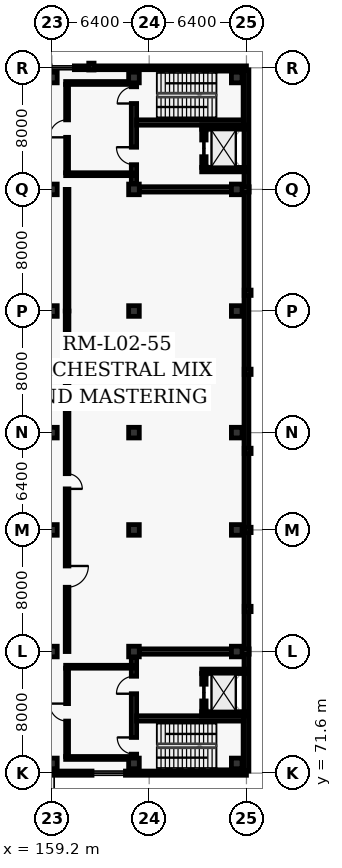
"""IFC4 building model, lengths in metres.
Left out: names, types, materials, properties, quantities, classifications, styles, units other than length and angle.
Written with IfcOpenShell. Run it as: python <this file> out.ifc"""

import sys

from ifc_helpers import new_model, si_unit, direction, frame, frame_2d, origin, origin_2d, place, context, subcontext, project, spatial, rectangle, extrude, element, fill, save


model = new_model("IFC4")
c1 = context("Model", 3, precision=1e-05, world=origin(), true_north=direction((0.0, 1.0)))
c2 = subcontext(c1, "Body", "Model", "MODEL_VIEW")
j1 = project(units=[si_unit("LENGTHUNIT", "METRE"), si_unit("PLANEANGLEUNIT", "RADIAN")], contexts=[c1])
p1 = place(None, origin())
s1 = spatial("IfcSite", under=j1, at=p1, CompositionType="ELEMENT")
p2 = place(p1, origin())
s2 = spatial("IfcBuilding", under=s1, at=p2, CompositionType="ELEMENT")
p3 = place(p2, frame((0.0, 0.0, 10.2)))
s3 = spatial("IfcBuildingStorey", under=s2, at=p3, CompositionType="ELEMENT", Elevation=10.2)
for number, where, z_axis, x_axis in (
    (1, (159.2, 72.24, 0.0), (0.0, 0.0, 1.0), (1.0, 0.0, 0.0)),
    (2, (159.2, 79.6, 0.0), (0.0, 0.0, 1.0), (1.0, 0.0, 0.0)),
    (3, (159.2, 87.6, 0.0), (0.0, 0.0, 1.0), (1.0, 0.0, 0.0)),
    (4, (159.2, 94.0, 0.0), (0.0, 0.0, 1.0), (1.0, 0.0, 0.0)),
    (5, (159.2, 102.0, 0.0), (0.0, 0.0, 1.0), (1.0, 0.0, 0.0)),
    (6, (159.2, 110.0, 0.0), (0.0, 0.0, 1.0), (1.0, 0.0, 0.0)),
    (7, (159.2, 117.36, 0.0), (0.0, 0.0, 1.0), (1.0, 0.0, 0.0)),
    (8, (164.6, 72.24, 0.0), (0.0, 0.0, 1.0), (1.0, 0.0, 0.0)),
    (9, (164.6, 79.6, 0.0), (0.0, 0.0, 1.0), (1.0, 0.0, 0.0)),
    (10, (164.6, 87.6, 0.0), (0.0, 0.0, 1.0), (1.0, 0.0, 0.0)),
    (11, (164.6, 94.0, 0.0), (0.0, 0.0, 1.0), (1.0, 0.0, 0.0)),
    (12, (164.6, 102.0, 0.0), (0.0, 0.0, 1.0), (1.0, 0.0, 0.0)),
    (13, (164.6, 110.0, 0.0), (0.0, 0.0, 1.0), (1.0, 0.0, 0.0)),
    (14, (164.6, 117.36, 0.0), (0.0, 0.0, 1.0), (1.0, 0.0, 0.0)),
    (15, (171.36, 72.24, 0.0), (0.0, 0.0, 1.0), (1.0, 0.0, 0.0)),
    (16, (171.36, 79.6, 0.0), (0.0, 0.0, 1.0), (1.0, 0.0, 0.0)),
    (17, (171.36, 87.6, 0.0), (0.0, 0.0, 1.0), (1.0, 0.0, 0.0)),
    (18, (171.36, 94.0, 0.0), (0.0, 0.0, 1.0), (1.0, 0.0, 0.0)),
    (19, (171.36, 102.0, 0.0), (0.0, 0.0, 1.0), (1.0, 0.0, 0.0)),
    (20, (171.36, 110.0, 0.0), (0.0, 0.0, 1.0), (1.0, 0.0, 0.0)),
    (21, (171.36, 117.36, 0.0), (0.0, 0.0, 1.0), (1.0, 0.0, 0.0)),
):
    element("IfcColumn", number, at=place(p3, frame(where, z_axis=z_axis, x_axis=x_axis)), inside=s3, PredefinedType="COLUMN", context=c2, shape_type="SweptSolid", body=[
        extrude(rectangle(XDim=0.7, YDim=0.7, at=origin_2d()), origin(), (0.0, 0.0, 1.0), 5.4),
    ])
for number, where, z_axis, x_axis in (
    (22, (172.08, 82.4, 0.0), (0.0, 0.0, 1.0), (1.0, 0.0, 0.0)),
    (23, (172.08, 87.6, 0.0), (0.0, 0.0, 1.0), (1.0, 0.0, 0.0)),
    (24, (172.08, 92.8, 0.0), (0.0, 0.0, 1.0), (1.0, 0.0, 0.0)),
    (25, (172.08, 98.0, 0.0), (0.0, 0.0, 1.0), (1.0, 0.0, 0.0)),
    (26, (172.08, 103.2, 0.0), (0.0, 0.0, 1.0), (1.0, 0.0, 0.0)),
    (27, (161.8, 118.08, 0.0), (0.0, 0.0, 1.0), (0.0, 1.0, 0.0)),
):
    element("IfcColumn", number, at=place(p3, frame(where, z_axis=z_axis, x_axis=x_axis)), inside=s3, PredefinedType="PILASTER", context=c2, shape_type="SweptSolid", body=[
        extrude(rectangle(XDim=0.35, YDim=0.45, at=origin_2d()), origin(), (0.0, 0.0, 1.0), 5.4),
    ])
p4 = place(p3, frame((139.6, 118.0, 0.0), z_axis=(0.0, 0.0, 1.0), x_axis=(1.0, 0.0, 0.0)))
e28 = element("IfcWall", 28, at=p4, inside=s3, PredefinedType="SOLIDWALL", context=c2, shape_type="SweptSolid", body=[
    extrude(rectangle(XDim=32.4, YDim=0.25, at=frame_2d((16.2, 0.0))), origin(), (0.0, 0.0, 1.0), 5.16),
])
p5 = place(p4, frame((2.2, 0.0, 0.9)))
e29 = element("IfcOpeningElement", 29, at=p5, cuts=e28, PredefinedType="OPENING", context=c2, shape_type="SweptSolid", body=[
    extrude(rectangle(XDim=3.4, YDim=2.55, at=frame_2d((1.7, 1.275))), frame((0.0, 0.135, 0.0), z_axis=(0.0, -1.0, 0.0), x_axis=(1.0, 0.0, 0.0)), (0.0, 0.0, 1.0), 0.27),
])
p6 = place(p4, frame((7.96, 0.0, 0.9)))
e30 = element("IfcOpeningElement", 30, at=p6, cuts=e28, PredefinedType="OPENING", context=c2, shape_type="SweptSolid", body=[
    extrude(rectangle(XDim=3.5, YDim=2.55, at=frame_2d((1.75, 1.275))), frame((0.0, 0.135, 0.0), z_axis=(0.0, -1.0, 0.0), x_axis=(1.0, 0.0, 0.0)), (0.0, 0.0, 1.0), 0.27),
])
p7 = place(p4, frame((12.27, 0.0, 0.9)))
e31 = element("IfcOpeningElement", 31, at=p7, cuts=e28, PredefinedType="OPENING", context=c2, shape_type="SweptSolid", body=[
    extrude(rectangle(XDim=3.6, YDim=2.6, at=frame_2d((1.8, 1.3))), frame((0.0, 0.135, 0.0), z_axis=(0.0, -1.0, 0.0), x_axis=(1.0, 0.0, 0.0)), (0.0, 0.0, 1.0), 0.27),
])
p8 = place(p4, frame((19.48, 0.0, 0.9)))
e32 = element("IfcOpeningElement", 32, at=p8, cuts=e28, PredefinedType="OPENING", context=c2, shape_type="SweptSolid", body=[
    extrude(rectangle(XDim=1.6, YDim=1.65, at=frame_2d((0.8, 0.825))), frame((0.0, 0.135, 0.0), z_axis=(0.0, -1.0, 0.0), x_axis=(1.0, 0.0, 0.0)), (0.0, 0.0, 1.0), 0.27),
])
p9 = place(p3, frame((172.0, 117.86, 0.0), z_axis=(0.0, 0.0, 1.0), x_axis=(0.0, -1.0, 0.0)))
e33 = element("IfcWall", 33, at=p9, inside=s3, PredefinedType="SOLIDWALL", context=c2, shape_type="SweptSolid", body=[
    extrude(rectangle(XDim=46.12, YDim=0.32, at=frame_2d((23.06, 0.0))), origin(), (0.0, 0.0, 1.0), 5.16),
])
p10 = place(p3, frame((172.0, 71.6, 0.0), z_axis=(0.0, 0.0, 1.0), x_axis=(-1.0, 0.0, 0.0)))
e34 = element("IfcWall", 34, at=p10, inside=s3, PredefinedType="SOLIDWALL", context=c2, shape_type="SweptSolid", body=[
    extrude(rectangle(XDim=32.4, YDim=0.275, at=frame_2d((16.2, 0.0))), origin(), (0.0, 0.0, 1.0), 5.16),
])
p11 = place(p10, frame((7.96, 0.0, 0.8)))
e35 = element("IfcOpeningElement", 35, at=p11, cuts=e34, PredefinedType="OPENING", context=c2, shape_type="SweptSolid", body=[
    extrude(rectangle(XDim=2.2, YDim=2.25, at=frame_2d((1.1, 1.125))), frame((0.0, 0.147, 0.0), z_axis=(0.0, -1.0, 0.0), x_axis=(1.0, 0.0, 0.0)), (0.0, 0.0, 1.0), 0.295),
])
p12 = place(p10, frame((13.72, 0.0, 0.8)))
e36 = element("IfcOpeningElement", 36, at=p12, cuts=e34, PredefinedType="OPENING", context=c2, shape_type="SweptSolid", body=[
    extrude(rectangle(XDim=2.3, YDim=2.25, at=frame_2d((1.15, 1.125))), frame((0.0, 0.147, 0.0), z_axis=(0.0, -1.0, 0.0), x_axis=(1.0, 0.0, 0.0)), (0.0, 0.0, 1.0), 0.295),
])
p13 = place(p10, frame((20.93, 0.0, 0.8)))
e37 = element("IfcOpeningElement", 37, at=p13, cuts=e34, PredefinedType="OPENING", context=c2, shape_type="SweptSolid", body=[
    extrude(rectangle(XDim=2.4, YDim=2.3, at=frame_2d((1.2, 1.15))), frame((0.0, 0.147, 0.0), z_axis=(0.0, -1.0, 0.0), x_axis=(1.0, 0.0, 0.0)), (0.0, 0.0, 1.0), 0.295),
])
p14 = place(p10, frame((25.24, 0.0, 0.8)))
e38 = element("IfcOpeningElement", 38, at=p14, cuts=e34, PredefinedType="OPENING", context=c2, shape_type="SweptSolid", body=[
    extrude(rectangle(XDim=2.5, YDim=2.3, at=frame_2d((1.25, 1.15))), frame((0.0, 0.147, 0.0), z_axis=(0.0, -1.0, 0.0), x_axis=(1.0, 0.0, 0.0)), (0.0, 0.0, 1.0), 0.295),
])
p15 = place(p10, frame((17.18, 0.0, 0.0)))
e39 = element("IfcOpeningElement", 39, at=p15, cuts=e34, PredefinedType="OPENING", context=c2, shape_type="SweptSolid", body=[
    extrude(rectangle(XDim=1.4, YDim=2.25, at=frame_2d((0.7, 1.125))), frame((0.0, 0.147, 0.0), z_axis=(0.0, -1.0, 0.0), x_axis=(1.0, 0.0, 0.0)), (0.0, 0.0, 1.0), 0.295),
])
p16 = place(p3, frame((164.952, 79.6, 0.0), z_axis=(0.0, 0.0, 1.0), x_axis=(1.0, 0.0, 0.0)))
e40 = element("IfcWall", 40, at=p16, inside=s3, PredefinedType="SHEAR", context=c2, shape_type="SweptSolid", body=[
    extrude(rectangle(XDim=7.223, YDim=0.35, at=frame_2d((3.612, 0.0))), origin(), (0.0, 0.0, 1.0), 5.16),
])
p17 = place(p3, frame((164.6, 71.775, 0.0), z_axis=(0.0, 0.0, 1.0), x_axis=(0.0, 1.0, 0.0)))
e41 = element("IfcWall", 41, at=p17, inside=s3, PredefinedType="SHEAR", context=c2, shape_type="SweptSolid", body=[
    extrude(rectangle(XDim=7.473, YDim=0.35, at=frame_2d((3.737, 0.0))), origin(), (0.0, 0.0, 1.0), 5.16),
])
p18 = place(p17, frame((1.075, 0.0, 0.0)))
e42 = element("IfcOpeningElement", 42, at=p18, cuts=e41, PredefinedType="OPENING", context=c2, shape_type="SweptSolid", body=[
    extrude(rectangle(XDim=1.1, YDim=2.15, at=frame_2d((0.55, 1.075))), frame((0.0, 0.185, 0.0), z_axis=(0.0, -1.0, 0.0), x_axis=(1.0, 0.0, 0.0)), (0.0, 0.0, 1.0), 0.37),
])
p19 = place(p17, frame((5.05, 0.0, 0.0)))
e43 = element("IfcOpeningElement", 43, at=p19, cuts=e41, PredefinedType="OPENING", context=c2, shape_type="SweptSolid", body=[
    extrude(rectangle(XDim=1.15, YDim=2.2, at=frame_2d((0.575, 1.1))), frame((0.0, 0.185, 0.0), z_axis=(0.0, -1.0, 0.0), x_axis=(1.0, 0.0, 0.0)), (0.0, 0.0, 1.0), 0.37),
])
p20 = place(p3, frame((164.775, 75.2, 0.0), z_axis=(0.0, 0.0, 1.0), x_axis=(1.0, 0.0, 0.0)))
e44 = element("IfcWall", 44, at=p20, inside=s3, PredefinedType="SHEAR", context=c2, shape_type="SweptSolid", body=[
    extrude(rectangle(XDim=7.05, YDim=0.35, at=frame_2d((3.525, 0.0))), origin(), (0.0, 0.0, 1.0), 5.16),
])
for number, where, z_axis, x_axis in (
    (45, (169.055, 75.5, 0.0), (0.0, 0.0, 1.0), (1.0, 0.0, 0.0)),
    (46, (169.055, 78.3, 0.0), (0.0, 0.0, 1.0), (1.0, 0.0, 0.0)),
):
    element("IfcWall", number, at=place(p3, frame(where, z_axis=z_axis, x_axis=x_axis)), inside=s3, PredefinedType="SHEAR", context=c2, shape_type="SweptSolid", body=[
        extrude(rectangle(XDim=2.89, YDim=0.29, at=frame_2d((1.445, 0.0))), origin(), (0.0, 0.0, 1.0), 5.16),
    ])
p21 = place(p3, frame((169.2, 75.645, 0.0), z_axis=(0.0, 0.0, 1.0), x_axis=(0.0, 1.0, 0.0)))
e47 = element("IfcWall", 47, at=p21, inside=s3, PredefinedType="SHEAR", context=c2, shape_type="SweptSolid", body=[
    extrude(rectangle(XDim=2.51, YDim=0.29, at=frame_2d((1.255, 0.0))), origin(), (0.0, 0.0, 1.0), 5.16),
])
p22 = place(p21, frame((0.705, 0.0, 0.0)))
e48 = element("IfcOpeningElement", 48, at=p22, cuts=e47, PredefinedType="OPENING", context=c2, shape_type="SweptSolid", body=[
    extrude(rectangle(XDim=1.1, YDim=2.15, at=frame_2d((0.55, 1.075))), frame((0.0, 0.155, 0.0), z_axis=(0.0, -1.0, 0.0), x_axis=(1.0, 0.0, 0.0)), (0.0, 0.0, 1.0), 0.31),
])
p23 = place(p3, frame((160.105, 72.6, 0.0), z_axis=(0.0, 0.0, 1.0), x_axis=(1.0, 0.0, 0.0)))
e49 = element("IfcWall", 49, at=p23, inside=s3, PredefinedType="PARTITIONING", context=c2, shape_type="SweptSolid", body=[
    extrude(rectangle(XDim=4.143, YDim=0.19, at=frame_2d((2.072, 0.0))), origin(), (0.0, 0.0, 1.0), 4.51),
])
p24 = place(p3, frame((160.105, 78.6, 0.0), z_axis=(0.0, 0.0, 1.0), x_axis=(1.0, 0.0, 0.0)))
e50 = element("IfcWall", 50, at=p24, inside=s3, PredefinedType="PARTITIONING", context=c2, shape_type="SweptSolid", body=[
    extrude(rectangle(XDim=4.495, YDim=0.19, at=frame_2d((2.248, 0.0))), origin(), (0.0, 0.0, 1.0), 5.16),
])
p25 = place(p3, frame((160.2, 72.695, 0.0), z_axis=(0.0, 0.0, 1.0), x_axis=(0.0, 1.0, 0.0)))
e51 = element("IfcWall", 51, at=p25, inside=s3, PredefinedType="PARTITIONING", context=c2, shape_type="SweptSolid", body=[
    extrude(rectangle(XDim=5.81, YDim=0.19, at=frame_2d((2.905, 0.0))), origin(), (0.0, 0.0, 1.0), 5.16),
])
p26 = place(p25, frame((2.33, 0.0, 0.0)))
e52 = element("IfcOpeningElement", 52, at=p26, cuts=e51, PredefinedType="OPENING", context=c2, shape_type="SweptSolid", body=[
    extrude(rectangle(XDim=1.15, YDim=2.2, at=frame_2d((0.575, 1.1))), frame((0.0, 0.105, 0.0), z_axis=(0.0, -1.0, 0.0), x_axis=(1.0, 0.0, 0.0)), (0.0, 0.0, 1.0), 0.21),
])
p27 = place(p3, frame((164.952, 110.0, 0.0), z_axis=(0.0, 0.0, 1.0), x_axis=(1.0, 0.0, 0.0)))
e53 = element("IfcWall", 53, at=p27, inside=s3, PredefinedType="SHEAR", context=c2, shape_type="SweptSolid", body=[
    extrude(rectangle(XDim=7.223, YDim=0.35, at=frame_2d((3.612, 0.0))), origin(), (0.0, 0.0, 1.0), 5.16),
])
p28 = place(p3, frame((164.6, 110.352, 0.0), z_axis=(0.0, 0.0, 1.0), x_axis=(0.0, 1.0, 0.0)))
e54 = element("IfcWall", 54, at=p28, inside=s3, PredefinedType="SHEAR", context=c2, shape_type="SweptSolid", body=[
    extrude(rectangle(XDim=7.473, YDim=0.35, at=frame_2d((3.736, 0.0))), origin(), (0.0, 0.0, 1.0), 5.16),
])
p29 = place(p28, frame((5.298, 0.0, 0.0)))
e55 = element("IfcOpeningElement", 55, at=p29, cuts=e54, PredefinedType="OPENING", context=c2, shape_type="SweptSolid", body=[
    extrude(rectangle(XDim=1.1, YDim=2.15, at=frame_2d((0.55, 1.075))), frame((0.0, 0.185, 0.0), z_axis=(0.0, -1.0, 0.0), x_axis=(1.0, 0.0, 0.0)), (0.0, 0.0, 1.0), 0.37),
])
p30 = place(p28, frame((1.273, 0.0, 0.0)))
e56 = element("IfcOpeningElement", 56, at=p30, cuts=e54, PredefinedType="OPENING", context=c2, shape_type="SweptSolid", body=[
    extrude(rectangle(XDim=1.15, YDim=2.2, at=frame_2d((0.575, 1.1))), frame((0.0, 0.185, 0.0), z_axis=(0.0, -1.0, 0.0), x_axis=(1.0, 0.0, 0.0)), (0.0, 0.0, 1.0), 0.37),
])
p31 = place(p3, frame((164.775, 114.4, 0.0), z_axis=(0.0, 0.0, 1.0), x_axis=(1.0, 0.0, 0.0)))
e57 = element("IfcWall", 57, at=p31, inside=s3, PredefinedType="SHEAR", context=c2, shape_type="SweptSolid", body=[
    extrude(rectangle(XDim=7.05, YDim=0.35, at=frame_2d((3.525, 0.0))), origin(), (0.0, 0.0, 1.0), 5.16),
])
for number, where, z_axis, x_axis in (
    (58, (169.055, 111.3, 0.0), (0.0, 0.0, 1.0), (1.0, 0.0, 0.0)),
    (59, (169.055, 114.1, 0.0), (0.0, 0.0, 1.0), (1.0, 0.0, 0.0)),
):
    element("IfcWall", number, at=place(p3, frame(where, z_axis=z_axis, x_axis=x_axis)), inside=s3, PredefinedType="SHEAR", context=c2, shape_type="SweptSolid", body=[
        extrude(rectangle(XDim=2.89, YDim=0.29, at=frame_2d((1.445, 0.0))), origin(), (0.0, 0.0, 1.0), 5.16),
    ])
p32 = place(p3, frame((169.2, 111.445, 0.0), z_axis=(0.0, 0.0, 1.0), x_axis=(0.0, 1.0, 0.0)))
e60 = element("IfcWall", 60, at=p32, inside=s3, PredefinedType="SHEAR", context=c2, shape_type="SweptSolid", body=[
    extrude(rectangle(XDim=2.51, YDim=0.29, at=frame_2d((1.255, 0.0))), origin(), (0.0, 0.0, 1.0), 5.16),
])
p33 = place(p32, frame((0.705, 0.0, 0.0)))
e61 = element("IfcOpeningElement", 61, at=p33, cuts=e60, PredefinedType="OPENING", context=c2, shape_type="SweptSolid", body=[
    extrude(rectangle(XDim=1.1, YDim=2.15, at=frame_2d((0.55, 1.075))), frame((0.0, 0.155, 0.0), z_axis=(0.0, -1.0, 0.0), x_axis=(1.0, 0.0, 0.0)), (0.0, 0.0, 1.0), 0.31),
])
p34 = place(p3, frame((160.105, 111.0, 0.0), z_axis=(0.0, 0.0, 1.0), x_axis=(1.0, 0.0, 0.0)))
e62 = element("IfcWall", 62, at=p34, inside=s3, PredefinedType="PARTITIONING", context=c2, shape_type="SweptSolid", body=[
    extrude(rectangle(XDim=4.495, YDim=0.19, at=frame_2d((2.248, 0.0))), origin(), (0.0, 0.0, 1.0), 5.16),
])
p35 = place(p3, frame((160.105, 117.0, 0.0), z_axis=(0.0, 0.0, 1.0), x_axis=(1.0, 0.0, 0.0)))
e63 = element("IfcWall", 63, at=p35, inside=s3, PredefinedType="PARTITIONING", context=c2, shape_type="SweptSolid", body=[
    extrude(rectangle(XDim=4.143, YDim=0.19, at=frame_2d((2.072, 0.0))), origin(), (0.0, 0.0, 1.0), 4.51),
])
p36 = place(p3, frame((160.2, 111.095, 0.0), z_axis=(0.0, 0.0, 1.0), x_axis=(0.0, 1.0, 0.0)))
e64 = element("IfcWall", 64, at=p36, inside=s3, PredefinedType="PARTITIONING", context=c2, shape_type="SweptSolid", body=[
    extrude(rectangle(XDim=5.81, YDim=0.19, at=frame_2d((2.905, 0.0))), origin(), (0.0, 0.0, 1.0), 5.16),
])
p37 = place(p36, frame((2.33, 0.0, 0.0)))
e65 = element("IfcOpeningElement", 65, at=p37, cuts=e64, PredefinedType="OPENING", context=c2, shape_type="SweptSolid", body=[
    extrude(rectangle(XDim=1.15, YDim=2.2, at=frame_2d((0.575, 1.1))), frame((0.0, 0.105, 0.0), z_axis=(0.0, -1.0, 0.0), x_axis=(1.0, 0.0, 0.0)), (0.0, 0.0, 1.0), 0.21),
])
p38 = place(p3, frame((160.2, 110.0, 0.0), z_axis=(0.0, 0.0, 1.0), x_axis=(0.0, -1.0, 0.0)))
e66 = element("IfcWall", 66, at=p38, inside=s3, PredefinedType="PARTITIONING", context=c2, shape_type="SweptSolid", body=[
    extrude(rectangle(XDim=8.0, YDim=0.24, at=frame_2d((4.0, 0.0))), origin(), (0.0, 0.0, 1.0), 5.16),
])
p39 = place(p3, frame((160.2, 102.0, 0.0), z_axis=(0.0, 0.0, 1.0), x_axis=(0.0, -1.0, 0.0)))
e67 = element("IfcWall", 67, at=p39, inside=s3, PredefinedType="PARTITIONING", context=c2, shape_type="SweptSolid", body=[
    extrude(rectangle(XDim=22.4, YDim=0.24, at=frame_2d((11.2, 0.0))), origin(), (0.0, 0.0, 1.0), 5.16),
])
p40 = place(p39, frame((10.7, 0.0, 0.0)))
e68 = element("IfcOpeningElement", 68, at=p40, cuts=e67, PredefinedType="OPENING", context=c2, shape_type="SweptSolid", body=[
    extrude(rectangle(XDim=1.0, YDim=2.1, at=frame_2d((0.5, 1.05))), frame((0.0, 0.13, 0.0), z_axis=(0.0, -1.0, 0.0), x_axis=(1.0, 0.0, 0.0)), (0.0, 0.0, 1.0), 0.26),
])
p41 = place(p39, frame((16.772, 0.0, 0.0)))
e69 = element("IfcOpeningElement", 69, at=p41, cuts=e67, PredefinedType="OPENING", context=c2, shape_type="SweptSolid", body=[
    extrude(rectangle(XDim=1.4, YDim=2.25, at=frame_2d((0.7, 1.125))), frame((0.0, 0.13, 0.0), z_axis=(0.0, -1.0, 0.0), x_axis=(1.0, 0.0, 0.0)), (0.0, 0.0, 1.0), 0.26),
])
p42 = place(p8, origin())
e70 = element("IfcWindow", 70, at=p42, inside=s3, PartitioningType="SINGLE_PANEL", PredefinedType="WINDOW", context=c2, shape_type="SweptSolid", body=[
    extrude(rectangle(XDim=1.6, YDim=1.65, at=frame_2d((0.8, 0.825))), frame((0.0, 0.03, 0.0), z_axis=(0.0, -1.0, 0.0), x_axis=(1.0, 0.0, 0.0)), (0.0, 0.0, 1.0), 0.06),
])
fill(e32, e70)
p43 = place(p11, origin())
e71 = element("IfcWindow", 71, at=p43, inside=s3, PartitioningType="SINGLE_PANEL", PredefinedType="WINDOW", context=c2, shape_type="SweptSolid", body=[
    extrude(rectangle(XDim=2.2, YDim=2.25, at=frame_2d((1.1, 1.125))), frame((0.0, 0.03, 0.0), z_axis=(0.0, -1.0, 0.0), x_axis=(1.0, 0.0, 0.0)), (0.0, 0.0, 1.0), 0.06),
])
fill(e35, e71)
p44 = place(p18, origin())
e72 = element("IfcDoor", 72, at=p44, inside=s3, OperationType="SINGLE_SWING_RIGHT", PredefinedType="DOOR", context=c2, shape_type="SweptSolid", body=[
    extrude(rectangle(XDim=1.1, YDim=2.15, at=frame_2d((0.55, 1.075))), frame((0.0, 0.025, 0.0), z_axis=(0.0, -1.0, 0.0), x_axis=(1.0, 0.0, 0.0)), (0.0, 0.0, 1.0), 0.05),
])
fill(e42, e72)
p45 = place(p19, origin())
e73 = element("IfcDoor", 73, at=p45, inside=s3, OperationType="SINGLE_SWING_LEFT", PredefinedType="DOOR", context=c2, shape_type="SweptSolid", body=[
    extrude(rectangle(XDim=1.15, YDim=2.2, at=frame_2d((0.575, 1.1))), frame((0.0, 0.025, 0.0), z_axis=(0.0, -1.0, 0.0), x_axis=(1.0, 0.0, 0.0)), (0.0, 0.0, 1.0), 0.05),
])
fill(e43, e73)
p46 = place(p22, origin())
e74 = element("IfcDoor", 74, at=p46, inside=s3, OperationType="SLIDING_TO_LEFT", PredefinedType="DOOR", context=c2, shape_type="SweptSolid", body=[
    extrude(rectangle(XDim=1.1, YDim=2.15, at=frame_2d((0.55, 1.075))), frame((0.0, 0.025, 0.0), z_axis=(0.0, -1.0, 0.0), x_axis=(1.0, 0.0, 0.0)), (0.0, 0.0, 1.0), 0.05),
])
fill(e48, e74)
p47 = place(p26, origin())
e75 = element("IfcDoor", 75, at=p47, inside=s3, OperationType="SINGLE_SWING_RIGHT", PredefinedType="DOOR", context=c2, shape_type="SweptSolid", body=[
    extrude(rectangle(XDim=1.15, YDim=2.2, at=frame_2d((0.575, 1.1))), frame((0.0, 0.025, 0.0), z_axis=(0.0, -1.0, 0.0), x_axis=(1.0, 0.0, 0.0)), (0.0, 0.0, 1.0), 0.05),
])
fill(e52, e75)
p48 = place(p29, origin())
e76 = element("IfcDoor", 76, at=p48, inside=s3, OperationType="SINGLE_SWING_LEFT", PredefinedType="DOOR", context=c2, shape_type="SweptSolid", body=[
    extrude(rectangle(XDim=1.1, YDim=2.15, at=frame_2d((0.55, 1.075))), frame((0.0, 0.025, 0.0), z_axis=(0.0, -1.0, 0.0), x_axis=(1.0, 0.0, 0.0)), (0.0, 0.0, 1.0), 0.05),
])
fill(e55, e76)
p49 = place(p30, origin())
e77 = element("IfcDoor", 77, at=p49, inside=s3, OperationType="SINGLE_SWING_RIGHT", PredefinedType="DOOR", context=c2, shape_type="SweptSolid", body=[
    extrude(rectangle(XDim=1.15, YDim=2.2, at=frame_2d((0.575, 1.1))), frame((0.0, 0.025, 0.0), z_axis=(0.0, -1.0, 0.0), x_axis=(1.0, 0.0, 0.0)), (0.0, 0.0, 1.0), 0.05),
])
fill(e56, e77)
p50 = place(p33, origin())
e78 = element("IfcDoor", 78, at=p50, inside=s3, OperationType="SLIDING_TO_LEFT", PredefinedType="DOOR", context=c2, shape_type="SweptSolid", body=[
    extrude(rectangle(XDim=1.1, YDim=2.15, at=frame_2d((0.55, 1.075))), frame((0.0, 0.025, 0.0), z_axis=(0.0, -1.0, 0.0), x_axis=(1.0, 0.0, 0.0)), (0.0, 0.0, 1.0), 0.05),
])
fill(e61, e78)
p51 = place(p37, origin())
e79 = element("IfcDoor", 79, at=p51, inside=s3, OperationType="SINGLE_SWING_LEFT", PredefinedType="DOOR", context=c2, shape_type="SweptSolid", body=[
    extrude(rectangle(XDim=1.15, YDim=2.2, at=frame_2d((0.575, 1.1))), frame((0.0, 0.025, 0.0), z_axis=(0.0, -1.0, 0.0), x_axis=(1.0, 0.0, 0.0)), (0.0, 0.0, 1.0), 0.05),
])
fill(e65, e79)
p52 = place(p40, origin())
e80 = element("IfcDoor", 80, at=p52, inside=s3, OperationType="SINGLE_SWING_RIGHT", PredefinedType="DOOR", context=c2, shape_type="SweptSolid", body=[
    extrude(rectangle(XDim=1.0, YDim=2.1, at=frame_2d((0.5, 1.05))), frame((0.0, 0.025, 0.0), z_axis=(0.0, -1.0, 0.0), x_axis=(1.0, 0.0, 0.0)), (0.0, 0.0, 1.0), 0.05),
])
fill(e68, e80)
p53 = place(p41, origin())
e81 = element("IfcDoor", 81, at=p53, inside=s3, OperationType="SINGLE_SWING_LEFT", PredefinedType="DOOR", context=c2, shape_type="SweptSolid", body=[
    extrude(rectangle(XDim=1.4, YDim=2.25, at=frame_2d((0.7, 1.125))), frame((0.0, 0.025, 0.0), z_axis=(0.0, -1.0, 0.0), x_axis=(1.0, 0.0, 0.0)), (0.0, 0.0, 1.0), 0.05),
])
fill(e69, e81)
save(model, sys.argv[1])
